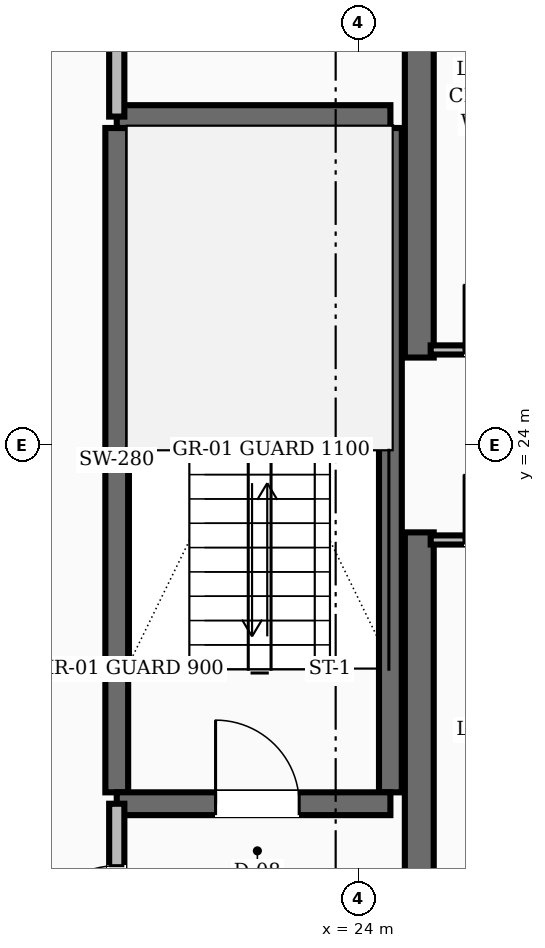
"""IFC4 building model, lengths in metres.
Left out: names, types, materials, properties, quantities, classifications, styles, units other than length and angle.
Written with IfcOpenShell. Run it as: python <this file> out.ifc"""

import sys

from ifc_helpers import new_model, si_unit, direction, frame, frame_2d, origin, place, context, subcontext, project, spatial, rectangle, extrude, element, fill, save


model = new_model("IFC4")
c1 = context("Model", 3, precision=1e-05, world=origin(), true_north=direction((0.0, 1.0)))
c2 = subcontext(c1, "Body", "Model", "MODEL_VIEW")
j1 = project(units=[si_unit("LENGTHUNIT", "METRE"), si_unit("PLANEANGLEUNIT", "RADIAN")], contexts=[c1])
p1 = place(None, origin())
s1 = spatial("IfcSite", under=j1, at=p1, CompositionType="ELEMENT")
p2 = place(p1, origin())
s2 = spatial("IfcBuilding", under=s1, at=p2, CompositionType="ELEMENT")
p3 = place(p2, frame((0.0, 0.0, 77.2)))
s3 = spatial("IfcBuildingStorey", under=s2, at=p3, CompositionType="ELEMENT", Elevation=77.2)
for number, where, z_axis, x_axis in (
    (1, (24.8, 16.55, 0.0), (0.0, 0.0, 1.0), (0.0, 1.0, 0.0)),
    (2, (24.8, 25.15, 0.0), (0.0, 0.0, 1.0), (0.0, 1.0, 0.0)),
):
    element("IfcWall", number, at=place(p3, frame(where, z_axis=z_axis, x_axis=x_axis)), inside=s3, PredefinedType="SHEAR", context=c2, shape_type="SweptSolid", body=[
        extrude(rectangle(XDim=6.3, YDim=0.38, at=frame_2d((3.15, 0.0))), origin(), (0.0, 0.0, 1.0), 3.6),
    ])
for number, where, z_axis, x_axis in (
    (3, (20.82, 19.43, 0.0), (0.0, 0.0, 1.0), (0.0, 1.0, 0.0)),
    (4, (24.42, 19.43, 0.0), (0.0, 0.0, 1.0), (0.0, 1.0, 0.0)),
):
    element("IfcWall", number, at=place(p3, frame(where, z_axis=z_axis, x_axis=x_axis)), inside=s3, PredefinedType="SHEAR", context=c2, shape_type="SweptSolid", body=[
        extrude(rectangle(XDim=8.74, YDim=0.3, at=frame_2d((4.37, 0.0))), origin(), (0.0, 0.0, 1.0), 3.6),
    ])
p4 = place(p3, frame((20.82, 19.28, 0.0), z_axis=(0.0, 0.0, 1.0), x_axis=(1.0, 0.0, 0.0)))
e5 = element("IfcWall", 5, at=p4, inside=s3, PredefinedType="SHEAR", context=c2, shape_type="SweptSolid", body=[
    extrude(rectangle(XDim=3.6, YDim=0.3, at=frame_2d((1.8, 0.0))), origin(), (0.0, 0.0, 1.0), 3.6),
])
p5 = place(p4, frame((1.3, 0.0, 0.0)))
e6 = element("IfcOpeningElement", 6, at=p5, cuts=e5, PredefinedType="OPENING", context=c2, shape_type="SweptSolid", body=[
    extrude(rectangle(XDim=1.1, YDim=2.1, at=frame_2d((0.55, 1.05))), frame((0.0, 0.16, 0.0), z_axis=(0.0, -1.0, 0.0), x_axis=(1.0, 0.0, 0.0)), (0.0, 0.0, 1.0), 0.32),
])
p6 = place(p3, frame((20.82, 28.32, 0.0), z_axis=(0.0, 0.0, 1.0), x_axis=(1.0, 0.0, 0.0)))
e7 = element("IfcWall", 7, at=p6, inside=s3, PredefinedType="SHEAR", context=c2, shape_type="SweptSolid", body=[
    extrude(rectangle(XDim=3.6, YDim=0.3, at=frame_2d((1.8, 0.0))), origin(), (0.0, 0.0, 1.0), 3.6),
])
p7 = place(p3, frame((20.82, 16.55, 0.0), z_axis=(0.0, 0.0, 1.0), x_axis=(0.0, 1.0, 0.0)))
e8 = element("IfcWall", 8, at=p7, inside=s3, PredefinedType="SOLIDWALL", context=c2, shape_type="SweptSolid", body=[
    extrude(rectangle(XDim=2.73, YDim=0.2, at=frame_2d((1.365, 0.0))), origin(), (0.0, 0.0, 1.0), 2.71),
])
p8 = place(p7, frame((0.815, 0.0, 0.0)))
e9 = element("IfcOpeningElement", 9, at=p8, cuts=e8, PredefinedType="OPENING", context=c2, shape_type="SweptSolid", body=[
    extrude(rectangle(XDim=1.1, YDim=2.1, at=frame_2d((0.55, 1.05))), frame((0.0, 0.11, 0.0), z_axis=(0.0, -1.0, 0.0), x_axis=(1.0, 0.0, 0.0)), (0.0, 0.0, 1.0), 0.22),
])
p9 = place(p3, frame((20.82, 28.32, 0.0), z_axis=(0.0, 0.0, 1.0), x_axis=(0.0, 1.0, 0.0)))
e10 = element("IfcWall", 10, at=p9, inside=s3, PredefinedType="SOLIDWALL", context=c2, shape_type="SweptSolid", body=[
    extrude(rectangle(XDim=3.13, YDim=0.2, at=frame_2d((1.565, 0.0))), origin(), (0.0, 0.0, 1.0), 2.71),
])
p10 = place(p9, frame((1.09, 0.0, 0.0)))
e11 = element("IfcOpeningElement", 11, at=p10, cuts=e10, PredefinedType="OPENING", context=c2, shape_type="SweptSolid", body=[
    extrude(rectangle(XDim=0.95, YDim=2.1, at=frame_2d((0.475, 1.05))), frame((0.0, 0.11, 0.0), z_axis=(0.0, -1.0, 0.0), x_axis=(1.0, 0.0, 0.0)), (0.0, 0.0, 1.0), 0.22),
])
p11 = place(p3, frame((24.95, 25.25, 0.0), z_axis=(0.0, 0.0, 1.0), x_axis=(1.0, 0.0, 0.0)))
e12 = element("IfcWall", 12, at=p11, inside=s3, PredefinedType="PARTITIONING", context=c2, shape_type="SweptSolid", body=[
    extrude(rectangle(XDim=3.2, YDim=0.12, at=frame_2d((1.6, 0.0))), origin(), (0.0, 0.0, 1.0), 2.71),
])
p12 = place(p11, frame((0.44, 0.0, 0.0)))
e13 = element("IfcOpeningElement", 13, at=p12, cuts=e12, PredefinedType="OPENING", context=c2, shape_type="SweptSolid", body=[
    extrude(rectangle(XDim=0.86, YDim=2.1, at=frame_2d((0.43, 1.05))), frame((0.0, 0.07, 0.0), z_axis=(0.0, -1.0, 0.0), x_axis=(1.0, 0.0, 0.0)), (0.0, 0.0, 1.0), 0.14),
])
p13 = place(p11, frame((1.9, 0.0, 0.0)))
e14 = element("IfcOpeningElement", 14, at=p13, cuts=e12, PredefinedType="OPENING", context=c2, shape_type="SweptSolid", body=[
    extrude(rectangle(XDim=0.86, YDim=2.1, at=frame_2d((0.43, 1.05))), frame((0.0, 0.07, 0.0), z_axis=(0.0, -1.0, 0.0), x_axis=(1.0, 0.0, 0.0)), (0.0, 0.0, 1.0), 0.14),
])
p14 = place(p3, frame((24.95, 22.75, 0.0), z_axis=(0.0, 0.0, 1.0), x_axis=(1.0, 0.0, 0.0)))
e15 = element("IfcWall", 15, at=p14, inside=s3, PredefinedType="PARTITIONING", context=c2, shape_type="SweptSolid", body=[
    extrude(rectangle(XDim=3.2, YDim=0.12, at=frame_2d((1.6, 0.0))), origin(), (0.0, 0.0, 1.0), 2.71),
])
p15 = place(p14, frame((0.44, 0.0, 0.0)))
e16 = element("IfcOpeningElement", 16, at=p15, cuts=e15, PredefinedType="OPENING", context=c2, shape_type="SweptSolid", body=[
    extrude(rectangle(XDim=0.86, YDim=2.1, at=frame_2d((0.43, 1.05))), frame((0.0, 0.07, 0.0), z_axis=(0.0, -1.0, 0.0), x_axis=(1.0, 0.0, 0.0)), (0.0, 0.0, 1.0), 0.14),
])
p16 = place(p14, frame((1.9, 0.0, 0.0)))
e17 = element("IfcOpeningElement", 17, at=p16, cuts=e15, PredefinedType="OPENING", context=c2, shape_type="SweptSolid", body=[
    extrude(rectangle(XDim=0.86, YDim=2.1, at=frame_2d((0.43, 1.05))), frame((0.0, 0.07, 0.0), z_axis=(0.0, -1.0, 0.0), x_axis=(1.0, 0.0, 0.0)), (0.0, 0.0, 1.0), 0.14),
])
p17 = place(p5, origin())
e18 = element("IfcDoor", 18, at=p17, inside=s3, OperationType="SINGLE_SWING_LEFT", PredefinedType="DOOR", context=c2, shape_type="SweptSolid", body=[
    extrude(rectangle(XDim=1.1, YDim=2.1, at=frame_2d((0.55, 1.05))), frame((0.0, 0.025, 0.0), z_axis=(0.0, -1.0, 0.0), x_axis=(1.0, 0.0, 0.0)), (0.0, 0.0, 1.0), 0.05),
])
fill(e6, e18)
p18 = place(p8, origin())
e19 = element("IfcDoor", 19, at=p18, inside=s3, OperationType="SINGLE_SWING_LEFT", PredefinedType="DOOR", context=c2, shape_type="SweptSolid", body=[
    extrude(rectangle(XDim=1.1, YDim=2.1, at=frame_2d((0.55, 1.05))), frame((0.0, 0.025, 0.0), z_axis=(0.0, -1.0, 0.0), x_axis=(1.0, 0.0, 0.0)), (0.0, 0.0, 1.0), 0.05),
])
fill(e9, e19)
p19 = place(p12, origin())
e20 = element("IfcDoor", 20, at=p19, inside=s3, OperationType="SINGLE_SWING_LEFT", PredefinedType="DOOR", context=c2, shape_type="SweptSolid", body=[
    extrude(rectangle(XDim=0.86, YDim=2.1, at=frame_2d((0.43, 1.05))), frame((0.0, 0.025, 0.0), z_axis=(0.0, -1.0, 0.0), x_axis=(1.0, 0.0, 0.0)), (0.0, 0.0, 1.0), 0.05),
])
fill(e13, e20)
p20 = place(p15, origin())
e21 = element("IfcDoor", 21, at=p20, inside=s3, OperationType="SINGLE_SWING_LEFT", PredefinedType="DOOR", context=c2, shape_type="SweptSolid", body=[
    extrude(rectangle(XDim=0.86, YDim=2.1, at=frame_2d((0.43, 1.05))), frame((0.0, 0.025, 0.0), z_axis=(0.0, -1.0, 0.0), x_axis=(1.0, 0.0, 0.0)), (0.0, 0.0, 1.0), 0.05),
])
fill(e16, e21)
save(model, sys.argv[1])
